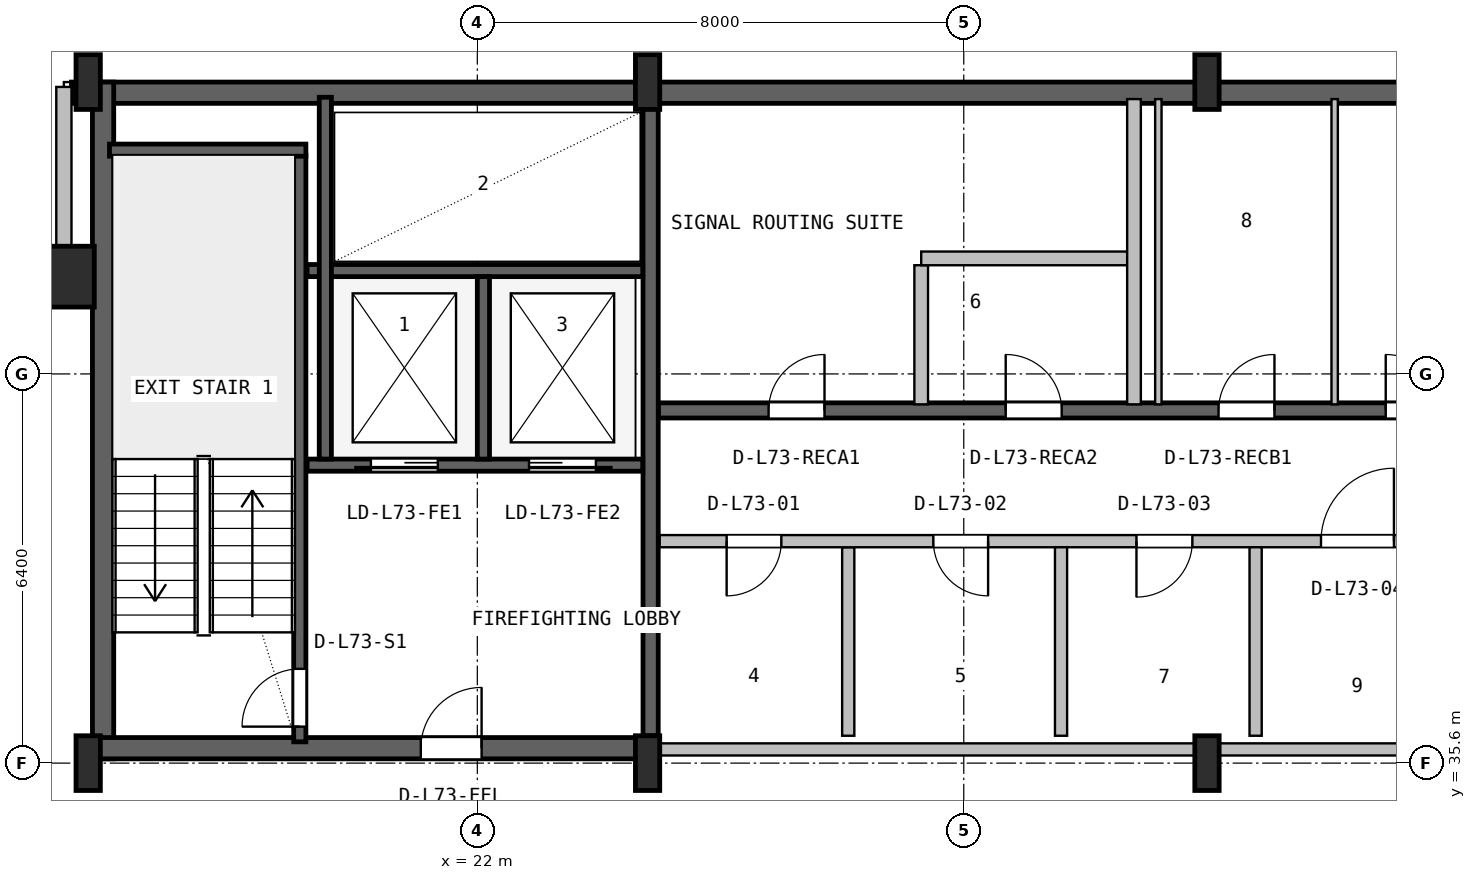
"""IFC4 building model, lengths in metres.
Left out: names, types, materials, properties, quantities, classifications, styles, units other than length and angle.
Written with IfcOpenShell. Run it as: python <this file> out.ifc"""

import sys

from ifc_helpers import new_model, si_unit, direction, frame, frame_2d, origin, origin_2d, place, context, subcontext, project, spatial, rectangle, hollow_rectangle, i_section, extrude, source, transform, mapped, element, fill, save


model = new_model("IFC4")
c1 = context("Model", 3, precision=1e-05, world=origin(), true_north=direction((0.0, 1.0)))
c2 = subcontext(c1, "Body", "Model", "MODEL_VIEW")
j1 = project(units=[si_unit("LENGTHUNIT", "METRE"), si_unit("PLANEANGLEUNIT", "RADIAN")], contexts=[c1])
p1 = place(None, origin())
s1 = spatial("IfcSite", under=j1, at=p1, CompositionType="ELEMENT")
p2 = place(p1, origin())
s2 = spatial("IfcBuilding", under=s1, at=p2, CompositionType="ELEMENT")
p3 = place(p2, frame((0.0, 0.0, 292.6)))
s3 = spatial("IfcBuildingStorey", under=s2, at=p3, CompositionType="ELEMENT", Elevation=292.6)
p4 = place(p3, frame((15.325, 46.625, 0.0), z_axis=(0.0, 0.0, 1.0), x_axis=(1.0, 0.0, 0.0)))
e1 = element("IfcWall", 1, at=p4, inside=s3, PredefinedType="SHEAR", context=c2, shape_type="SweptSolid", body=[
    extrude(rectangle(XDim=37.35, YDim=0.35, at=frame_2d((18.675, 0.0))), origin(), (0.0, 0.0, 1.0), 3.55),
])
p5 = place(p3, frame((15.845, 35.67, 0.0), z_axis=(0.0, 0.0, 1.0), x_axis=(0.0, 1.0, 0.0)))
e2 = element("IfcWall", 2, at=p5, inside=s3, PredefinedType="SHEAR", context=c2, shape_type="SweptSolid", body=[
    extrude(rectangle(XDim=11.13, YDim=0.35, at=frame_2d((5.565, 0.0))), origin(), (0.0, 0.0, 1.0), 3.55),
])
p6 = place(p3, frame((15.67, 35.845, 0.0), z_axis=(0.0, 0.0, 1.0), x_axis=(1.0, 0.0, 0.0)))
e3 = element("IfcWall", 3, at=p6, inside=s3, PredefinedType="SHEAR", context=c2, shape_type="SweptSolid", body=[
    extrude(rectangle(XDim=9.13, YDim=0.35, at=frame_2d((4.565, 0.0))), origin(), (0.0, 0.0, 1.0), 3.55),
])
p7 = place(p6, frame((5.4, 0.0, 0.0)))
e4 = element("IfcOpeningElement", 4, at=p7, cuts=e3, PredefinedType="OPENING", context=c2, shape_type="SweptSolid", body=[
    extrude(rectangle(XDim=1.0, YDim=2.1, at=frame_2d((0.5, 1.05))), frame((0.0, 0.185, 0.0), z_axis=(0.0, -1.0, 0.0), x_axis=(1.0, 0.0, 0.0)), (0.0, 0.0, 1.0), 0.37),
])
m1 = source(origin(), c2, "Body", "SweptSolid", [
    extrude(i_section(OverallWidth=0.4, OverallDepth=0.9, WebThickness=0.016, FlangeThickness=0.028, FilletRadius=0.016, at=origin_2d()), origin(), (0.0, 0.0, 1.0), 3.8),
])
for number, where, z_axis, x_axis in (
    (5, (15.6, 35.6, 0.0), (0.0, 0.0, 1.0), (1.0, 0.0, 0.0)),
    (6, (15.6, 46.8, 0.0), (0.0, 0.0, 1.0), (1.0, 0.0, 0.0)),
    (7, (24.8, 35.6, 0.0), (0.0, 0.0, 1.0), (1.0, 0.0, 0.0)),
    (8, (24.8, 46.8, 0.0), (0.0, 0.0, 1.0), (1.0, 0.0, 0.0)),
    (9, (34.0, 35.6, 0.0), (0.0, 0.0, 1.0), (1.0, 0.0, 0.0)),
    (10, (34.0, 46.8, 0.0), (0.0, 0.0, 1.0), (1.0, 0.0, 0.0)),
):
    element("IfcColumn", number, at=place(p3, frame(where, z_axis=z_axis, x_axis=x_axis)), inside=s3, PredefinedType="COLUMN", context=c2, shape_type="MappedRepresentation", body=[
        mapped(m1, transform((0.0, 0.0, 0.0), x_axis=(1.0, 0.0, 0.0), y_axis=(0.0, 1.0, 0.0), z_axis=(0.0, 0.0, 1.0), scale=1.0)),
    ])
m2 = source(origin(), c2, "Body", "SweptSolid", [
    extrude(hollow_rectangle(XDim=1.0, YDim=1.0, WallThickness=0.04, at=origin_2d()), origin(), (0.0, 0.0, 1.0), 3.8),
])
p8 = place(p3, frame((15.2, 43.6, 0.0), z_axis=(0.0, 0.0, 1.0), x_axis=(1.0, 0.0, 0.0)))
e11 = element("IfcColumn", 11, at=p8, inside=s3, PredefinedType="COLUMN", context=c2, shape_type="MappedRepresentation", body=[
    mapped(m2, transform((0.0, 0.0, 0.0), x_axis=(1.0, 0.0, 0.0), y_axis=(0.0, 1.0, 0.0), z_axis=(0.0, 0.0, 1.0), scale=1.0)),
])
p9 = place(p3, frame((12.08, 43.6, 0.0), z_axis=(0.0, 0.0, 1.0), x_axis=(1.0, 0.0, 0.0)))
e12 = element("IfcWall", 12, at=p9, inside=s3, PredefinedType="SOLIDWALL", context=c2, shape_type="SweptSolid", body=[
    extrude(rectangle(XDim=2.99, YDim=0.25, at=frame_2d((1.495, 0.0))), origin(), (0.0, 0.0, 1.0), 3.53),
])
p10 = place(p3, frame((15.2, 43.52, 0.0), z_axis=(0.0, 0.0, 1.0), x_axis=(0.0, 1.0, 0.0)))
e13 = element("IfcWall", 13, at=p10, inside=s3, PredefinedType="SOLIDWALL", context=c2, shape_type="SweptSolid", body=[
    extrude(rectangle(XDim=3.2, YDim=0.25, at=frame_2d((1.6, 0.0))), origin(), (0.0, 0.0, 1.0), 3.171),
])
p11 = place(p3, frame((19.08, 35.95, 0.0), z_axis=(0.0, 0.0, 1.0), x_axis=(0.0, 1.0, 0.0)))
e14 = element("IfcWall", 14, at=p11, inside=s3, PredefinedType="SHEAR", context=c2, shape_type="SweptSolid", body=[
    extrude(rectangle(XDim=9.65, YDim=0.2, at=frame_2d((4.825, 0.0))), origin(), (0.0, 0.0, 1.0), 3.55),
])
p12 = place(p11, frame((0.25, 0.0, 0.0)))
e15 = element("IfcOpeningElement", 15, at=p12, cuts=e14, PredefinedType="OPENING", context=c2, shape_type="SweptSolid", body=[
    extrude(rectangle(XDim=0.95, YDim=2.1, at=frame_2d((0.475, 1.05))), frame((0.0, 0.11, 0.0), z_axis=(0.0, -1.0, 0.0), x_axis=(1.0, 0.0, 0.0)), (0.0, 0.0, 1.0), 0.22),
])
p13 = place(p3, frame((15.95, 45.68, 0.0), z_axis=(0.0, 0.0, 1.0), x_axis=(1.0, 0.0, 0.0)))
e16 = element("IfcWall", 16, at=p13, inside=s3, PredefinedType="SHEAR", context=c2, shape_type="SweptSolid", body=[
    extrude(rectangle(XDim=3.23, YDim=0.2, at=frame_2d((1.615, 0.0))), origin(), (0.0, 0.0, 1.0), 3.55),
])
p14 = place(p3, frame((24.85, 36.05, 0.0), z_axis=(0.0, 0.0, 1.0), x_axis=(0.0, 1.0, 0.0)))
e17 = element("IfcWall", 17, at=p14, inside=s3, PredefinedType="SHEAR", context=c2, shape_type="SweptSolid", body=[
    extrude(rectangle(XDim=10.45, YDim=0.25, at=frame_2d((5.225, 0.0))), origin(), (0.0, 0.0, 1.0), 3.55),
])
p15 = place(p3, frame((19.2, 40.5, 0.0), z_axis=(0.0, 0.0, 1.0), x_axis=(1.0, 0.0, 0.0)))
e18 = element("IfcWall", 18, at=p15, inside=s3, PredefinedType="SHEAR", context=c2, shape_type="SweptSolid", body=[
    extrude(rectangle(XDim=5.52, YDim=0.2, at=frame_2d((2.76, 0.0))), origin(), (0.0, 0.0, 1.0), 3.55),
])
p16 = place(p15, frame((1.05, 0.0, 0.0)))
e19 = element("IfcOpeningElement", 19, at=p16, cuts=e18, PredefinedType="OPENING", context=c2, shape_type="SweptSolid", body=[
    extrude(rectangle(XDim=1.1, YDim=2.18, at=frame_2d((0.55, 1.09))), frame((0.0, 0.11, 0.0), z_axis=(0.0, -1.0, 0.0), x_axis=(1.0, 0.0, 0.0)), (0.0, 0.0, 1.0), 0.22),
])
p17 = place(p15, frame((3.65, 0.0, 0.0)))
e20 = element("IfcOpeningElement", 20, at=p17, cuts=e18, PredefinedType="OPENING", context=c2, shape_type="SweptSolid", body=[
    extrude(rectangle(XDim=1.1, YDim=2.18, at=frame_2d((0.55, 1.09))), frame((0.0, 0.11, 0.0), z_axis=(0.0, -1.0, 0.0), x_axis=(1.0, 0.0, 0.0)), (0.0, 0.0, 1.0), 0.22),
])
p18 = place(p3, frame((19.2, 43.7, 0.0), z_axis=(0.0, 0.0, 1.0), x_axis=(1.0, 0.0, 0.0)))
e21 = element("IfcWall", 21, at=p18, inside=s3, PredefinedType="SHEAR", context=c2, shape_type="SweptSolid", body=[
    extrude(rectangle(XDim=5.52, YDim=0.2, at=frame_2d((2.76, 0.0))), origin(), (0.0, 0.0, 1.0), 3.55),
])
p19 = place(p3, frame((22.1, 40.6, 0.0), z_axis=(0.0, 0.0, 1.0), x_axis=(0.0, 1.0, 0.0)))
e22 = element("IfcWall", 22, at=p19, inside=s3, PredefinedType="SHEAR", context=c2, shape_type="SweptSolid", body=[
    extrude(rectangle(XDim=3.0, YDim=0.2, at=frame_2d((1.5, 0.0))), origin(), (0.0, 0.0, 1.0), 3.55),
])
p20 = place(p3, frame((19.5, 40.6, 0.0), z_axis=(0.0, 0.0, 1.0), x_axis=(0.0, 1.0, 0.0)))
e23 = element("IfcWall", 23, at=p20, inside=s3, PredefinedType="SHEAR", context=c2, shape_type="SweptSolid", body=[
    extrude(rectangle(XDim=5.95, YDim=0.2, at=frame_2d((2.975, 0.0))), origin(), (0.0, 0.0, 1.0), 3.55),
])
p21 = place(p3, frame((24.98, 41.4, 0.0), z_axis=(0.0, 0.0, 1.0), x_axis=(1.0, 0.0, 0.0)))
e24 = element("IfcWall", 24, at=p21, inside=s3, PredefinedType="SHEAR", context=c2, shape_type="SweptSolid", body=[
    extrude(rectangle(XDim=23.82, YDim=0.25, at=frame_2d((11.91, 0.0))), origin(), (0.0, 0.0, 1.0), 3.55),
])
p22 = place(p21, frame((16.87, 0.0, 0.0)))
e25 = element("IfcOpeningElement", 25, at=p22, cuts=e24, PredefinedType="OPENING", context=c2, shape_type="SweptSolid", body=[
    extrude(rectangle(XDim=1.1, YDim=2.18, at=frame_2d((0.55, 1.09))), frame((0.0, 0.135, 0.0), z_axis=(0.0, -1.0, 0.0), x_axis=(1.0, 0.0, 0.0)), (0.0, 0.0, 1.0), 0.27),
])
p23 = place(p21, frame((19.47, 0.0, 0.0)))
e26 = element("IfcOpeningElement", 26, at=p23, cuts=e24, PredefinedType="OPENING", context=c2, shape_type="SweptSolid", body=[
    extrude(rectangle(XDim=1.1, YDim=2.18, at=frame_2d((0.55, 1.09))), frame((0.0, 0.135, 0.0), z_axis=(0.0, -1.0, 0.0), x_axis=(1.0, 0.0, 0.0)), (0.0, 0.0, 1.0), 0.27),
])
p24 = place(p21, frame((22.07, 0.0, 0.0)))
e27 = element("IfcOpeningElement", 27, at=p24, cuts=e24, PredefinedType="OPENING", context=c2, shape_type="SweptSolid", body=[
    extrude(rectangle(XDim=1.1, YDim=2.18, at=frame_2d((0.55, 1.09))), frame((0.0, 0.135, 0.0), z_axis=(0.0, -1.0, 0.0), x_axis=(1.0, 0.0, 0.0)), (0.0, 0.0, 1.0), 0.27),
])
p25 = place(p21, frame((1.81, 0.0, 0.0)))
e28 = element("IfcOpeningElement", 28, at=p25, cuts=e24, PredefinedType="OPENING", context=c2, shape_type="SweptSolid", body=[
    extrude(rectangle(XDim=0.92, YDim=2.08, at=frame_2d((0.46, 1.04))), frame((0.0, 0.135, 0.0), z_axis=(0.0, -1.0, 0.0), x_axis=(1.0, 0.0, 0.0)), (0.0, 0.0, 1.0), 0.27),
])
p26 = place(p21, frame((5.71, 0.0, 0.0)))
e29 = element("IfcOpeningElement", 29, at=p26, cuts=e24, PredefinedType="OPENING", context=c2, shape_type="SweptSolid", body=[
    extrude(rectangle(XDim=0.92, YDim=2.08, at=frame_2d((0.46, 1.04))), frame((0.0, 0.135, 0.0), z_axis=(0.0, -1.0, 0.0), x_axis=(1.0, 0.0, 0.0)), (0.0, 0.0, 1.0), 0.27),
])
p27 = place(p21, frame((9.21, 0.0, 0.0)))
e30 = element("IfcOpeningElement", 30, at=p27, cuts=e24, PredefinedType="OPENING", context=c2, shape_type="SweptSolid", body=[
    extrude(rectangle(XDim=0.92, YDim=2.08, at=frame_2d((0.46, 1.04))), frame((0.0, 0.135, 0.0), z_axis=(0.0, -1.0, 0.0), x_axis=(1.0, 0.0, 0.0)), (0.0, 0.0, 1.0), 0.27),
])
p28 = place(p21, frame((11.96, 0.0, 0.0)))
e31 = element("IfcOpeningElement", 31, at=p28, cuts=e24, PredefinedType="OPENING", context=c2, shape_type="SweptSolid", body=[
    extrude(rectangle(XDim=0.92, YDim=2.08, at=frame_2d((0.46, 1.04))), frame((0.0, 0.135, 0.0), z_axis=(0.0, -1.0, 0.0), x_axis=(1.0, 0.0, 0.0)), (0.0, 0.0, 1.0), 0.27),
])
p29 = place(p21, frame((14.31, 0.0, 0.0)))
e32 = element("IfcOpeningElement", 32, at=p29, cuts=e24, PredefinedType="OPENING", context=c2, shape_type="SweptSolid", body=[
    extrude(rectangle(XDim=0.92, YDim=2.08, at=frame_2d((0.46, 1.04))), frame((0.0, 0.135, 0.0), z_axis=(0.0, -1.0, 0.0), x_axis=(1.0, 0.0, 0.0)), (0.0, 0.0, 1.0), 0.27),
])
p30 = place(p3, frame((25.0, 35.825, 0.0), z_axis=(0.0, 0.0, 1.0), x_axis=(1.0, 0.0, 0.0)))
e33 = element("IfcWall", 33, at=p30, inside=s3, PredefinedType="SOLIDWALL", context=c2, shape_type="SweptSolid", body=[
    extrude(rectangle(XDim=12.95, YDim=0.2, at=frame_2d((6.475, 0.0))), origin(), (0.0, 0.0, 1.0), 2.575),
])
p31 = place(p3, frame((28.1, 36.05, 0.0), z_axis=(0.0, 0.0, 1.0), x_axis=(0.0, 1.0, 0.0)))
e34 = element("IfcWall", 34, at=p31, inside=s3, PredefinedType="PLUMBINGWALL", context=c2, shape_type="SweptSolid", body=[
    extrude(rectangle(XDim=3.1, YDim=0.2, at=frame_2d((1.55, 0.0))), origin(), (0.0, 0.0, 1.0), 3.53),
])
p32 = place(p3, frame((25.0, 39.25, 0.0), z_axis=(0.0, 0.0, 1.0), x_axis=(1.0, 0.0, 0.0)))
e35 = element("IfcWall", 35, at=p32, inside=s3, PredefinedType="SOLIDWALL", context=c2, shape_type="SweptSolid", body=[
    extrude(rectangle(XDim=12.95, YDim=0.2, at=frame_2d((6.475, 0.0))), origin(), (0.0, 0.0, 1.0), 3.53),
])
p33 = place(p32, frame((1.1, 0.0, 0.0)))
e36 = element("IfcOpeningElement", 36, at=p33, cuts=e35, PredefinedType="OPENING", context=c2, shape_type="SweptSolid", body=[
    extrude(rectangle(XDim=0.9, YDim=2.06, at=frame_2d((0.45, 1.03))), frame((0.0, 0.11, 0.0), z_axis=(0.0, -1.0, 0.0), x_axis=(1.0, 0.0, 0.0)), (0.0, 0.0, 1.0), 0.22),
])
p34 = place(p32, frame((4.5, 0.0, 0.0)))
e37 = element("IfcOpeningElement", 37, at=p34, cuts=e35, PredefinedType="OPENING", context=c2, shape_type="SweptSolid", body=[
    extrude(rectangle(XDim=0.9, YDim=2.06, at=frame_2d((0.45, 1.03))), frame((0.0, 0.11, 0.0), z_axis=(0.0, -1.0, 0.0), x_axis=(1.0, 0.0, 0.0)), (0.0, 0.0, 1.0), 0.22),
])
p35 = place(p32, frame((7.84, 0.0, 0.0)))
e38 = element("IfcOpeningElement", 38, at=p35, cuts=e35, PredefinedType="OPENING", context=c2, shape_type="SweptSolid", body=[
    extrude(rectangle(XDim=0.92, YDim=2.08, at=frame_2d((0.46, 1.04))), frame((0.0, 0.11, 0.0), z_axis=(0.0, -1.0, 0.0), x_axis=(1.0, 0.0, 0.0)), (0.0, 0.0, 1.0), 0.22),
])
p36 = place(p32, frame((10.875, 0.0, 0.0)))
e39 = element("IfcOpeningElement", 39, at=p36, cuts=e35, PredefinedType="OPENING", context=c2, shape_type="SweptSolid", body=[
    extrude(rectangle(XDim=1.2, YDim=2.1, at=frame_2d((0.6, 1.05))), frame((0.0, 0.11, 0.0), z_axis=(0.0, -1.0, 0.0), x_axis=(1.0, 0.0, 0.0)), (0.0, 0.0, 1.0), 0.22),
])
p37 = place(p3, frame((31.6, 36.05, 0.0), z_axis=(0.0, 0.0, 1.0), x_axis=(0.0, 1.0, 0.0)))
e40 = element("IfcWall", 40, at=p37, inside=s3, PredefinedType="PLUMBINGWALL", context=c2, shape_type="SweptSolid", body=[
    extrude(rectangle(XDim=3.1, YDim=0.2, at=frame_2d((1.55, 0.0))), origin(), (0.0, 0.0, 1.0), 3.53),
])
p38 = place(p3, frame((34.8, 36.05, 0.0), z_axis=(0.0, 0.0, 1.0), x_axis=(0.0, 1.0, 0.0)))
e41 = element("IfcWall", 41, at=p38, inside=s3, PredefinedType="SOLIDWALL", context=c2, shape_type="SweptSolid", body=[
    extrude(rectangle(XDim=3.1, YDim=0.2, at=frame_2d((1.55, 0.0))), origin(), (0.0, 0.0, 1.0), 3.53),
])
p39 = place(p3, frame((29.3, 41.5, 0.0), z_axis=(0.0, 0.0, 1.0), x_axis=(0.0, 1.0, 0.0)))
e42 = element("IfcWall", 42, at=p39, inside=s3, PredefinedType="PARTITIONING", context=c2, shape_type="SweptSolid", body=[
    extrude(rectangle(XDim=2.288, YDim=0.225, at=frame_2d((1.144, 0.0))), origin(), (0.0, 0.0, 1.0), 3.53),
])
p40 = place(p3, frame((29.3, 43.9, 0.0), z_axis=(0.0, 0.0, 1.0), x_axis=(1.0, 0.0, 0.0)))
e43 = element("IfcWall", 43, at=p40, inside=s3, PredefinedType="PARTITIONING", context=c2, shape_type="SweptSolid", body=[
    extrude(rectangle(XDim=3.5, YDim=0.225, at=frame_2d((1.75, 0.0))), origin(), (0.0, 0.0, 1.0), 3.53),
])
p41 = place(p3, frame((32.8, 41.5, 0.0), z_axis=(0.0, 0.0, 1.0), x_axis=(0.0, 1.0, 0.0)))
e44 = element("IfcWall", 44, at=p41, inside=s3, PredefinedType="PARTITIONING", context=c2, shape_type="SweptSolid", body=[
    extrude(rectangle(XDim=5.02, YDim=0.225, at=frame_2d((2.51, 0.0))), origin(), (0.0, 0.0, 1.0), 3.53),
])
for number, where, z_axis, x_axis in (
    (45, (36.1, 41.5, 0.0), (0.0, 0.0, 1.0), (0.0, 1.0, 0.0)),
    (46, (33.2, 41.5, 0.0), (0.0, 0.0, 1.0), (0.0, 1.0, 0.0)),
):
    element("IfcWall", number, at=place(p3, frame(where, z_axis=z_axis, x_axis=x_axis)), inside=s3, PredefinedType="PARTITIONING", context=c2, shape_type="SweptSolid", body=[
        extrude(rectangle(XDim=5.02, YDim=0.105, at=frame_2d((2.51, 0.0))), origin(), (0.0, 0.0, 1.0), 3.53),
    ])
m3 = source(origin(), c2, "Body", "SweptSolid", [
    extrude(rectangle(XDim=0.95, YDim=2.1, at=frame_2d((0.475, 1.05))), frame((0.0, 0.025, 0.0), z_axis=(0.0, -1.0, 0.0), x_axis=(1.0, 0.0, 0.0)), (0.0, 0.0, 1.0), 0.05),
])
p42 = place(p12, origin())
e47 = element("IfcDoor", 47, at=p42, inside=s3, OperationType="SINGLE_SWING_LEFT", PredefinedType="DOOR", context=c2, shape_type="MappedRepresentation", body=[
    mapped(m3, transform((0.0, 0.0, 0.0), x_axis=(1.0, 0.0, 0.0), y_axis=(0.0, 1.0, 0.0), z_axis=(0.0, 0.0, 1.0), scale=1.0)),
])
fill(e15, e47)
m4 = source(origin(), c2, "Body", "SweptSolid", [
    extrude(rectangle(XDim=1.0, YDim=2.1, at=frame_2d((0.5, 1.05))), frame((0.0, 0.025, 0.0), z_axis=(0.0, -1.0, 0.0), x_axis=(1.0, 0.0, 0.0)), (0.0, 0.0, 1.0), 0.05),
])
p43 = place(p7, origin())
e48 = element("IfcDoor", 48, at=p43, inside=s3, OperationType="SINGLE_SWING_RIGHT", PredefinedType="DOOR", context=c2, shape_type="MappedRepresentation", body=[
    mapped(m4, transform((0.0, 0.0, 0.0), x_axis=(1.0, 0.0, 0.0), y_axis=(0.0, 1.0, 0.0), z_axis=(0.0, 0.0, 1.0), scale=1.0)),
])
fill(e4, e48)
m5 = source(origin(), c2, "Body", "SweptSolid", [
    extrude(rectangle(XDim=1.1, YDim=2.18, at=frame_2d((0.55, 1.09))), frame((0.0, 0.025, 0.0), z_axis=(0.0, -1.0, 0.0), x_axis=(1.0, 0.0, 0.0)), (0.0, 0.0, 1.0), 0.05),
])
p44 = place(p16, frame((1.1, 0.0, 0.0), z_axis=(0.0, 0.0, 1.0), x_axis=(-1.0, 0.0, 0.0)))
e49 = element("IfcDoor", 49, at=p44, inside=s3, OperationType="SLIDING_TO_LEFT", PredefinedType="DOOR", context=c2, shape_type="MappedRepresentation", body=[
    mapped(m5, transform((0.0, 0.0, 0.0), x_axis=(1.0, 0.0, 0.0), y_axis=(0.0, 1.0, 0.0), z_axis=(0.0, 0.0, 1.0), scale=1.0)),
])
fill(e19, e49)
p45 = place(p17, frame((1.1, 0.0, 0.0), z_axis=(0.0, 0.0, 1.0), x_axis=(-1.0, 0.0, 0.0)))
e50 = element("IfcDoor", 50, at=p45, inside=s3, OperationType="SLIDING_TO_RIGHT", PredefinedType="DOOR", context=c2, shape_type="MappedRepresentation", body=[
    mapped(m5, transform((0.0, 0.0, 0.0), x_axis=(1.0, 0.0, 0.0), y_axis=(0.0, 1.0, 0.0), z_axis=(0.0, 0.0, 1.0), scale=1.0)),
])
fill(e20, e50)
m6 = source(origin(), c2, "Body", "SweptSolid", [
    extrude(rectangle(XDim=0.92, YDim=2.08, at=frame_2d((0.46, 1.04))), frame((0.0, 0.025, 0.0), z_axis=(0.0, -1.0, 0.0), x_axis=(1.0, 0.0, 0.0)), (0.0, 0.0, 1.0), 0.05),
])
p46 = place(p25, origin())
e51 = element("IfcDoor", 51, at=p46, inside=s3, OperationType="SINGLE_SWING_RIGHT", PredefinedType="DOOR", context=c2, shape_type="MappedRepresentation", body=[
    mapped(m6, transform((0.0, 0.0, 0.0), x_axis=(1.0, 0.0, 0.0), y_axis=(0.0, 1.0, 0.0), z_axis=(0.0, 0.0, 1.0), scale=1.0)),
])
fill(e28, e51)
p47 = place(p26, origin())
e52 = element("IfcDoor", 52, at=p47, inside=s3, OperationType="SINGLE_SWING_LEFT", PredefinedType="DOOR", context=c2, shape_type="MappedRepresentation", body=[
    mapped(m6, transform((0.0, 0.0, 0.0), x_axis=(1.0, 0.0, 0.0), y_axis=(0.0, 1.0, 0.0), z_axis=(0.0, 0.0, 1.0), scale=1.0)),
])
fill(e29, e52)
p48 = place(p27, origin())
e53 = element("IfcDoor", 53, at=p48, inside=s3, OperationType="SINGLE_SWING_RIGHT", PredefinedType="DOOR", context=c2, shape_type="MappedRepresentation", body=[
    mapped(m6, transform((0.0, 0.0, 0.0), x_axis=(1.0, 0.0, 0.0), y_axis=(0.0, 1.0, 0.0), z_axis=(0.0, 0.0, 1.0), scale=1.0)),
])
fill(e30, e53)
p49 = place(p28, origin())
e54 = element("IfcDoor", 54, at=p49, inside=s3, OperationType="SINGLE_SWING_LEFT", PredefinedType="DOOR", context=c2, shape_type="MappedRepresentation", body=[
    mapped(m6, transform((0.0, 0.0, 0.0), x_axis=(1.0, 0.0, 0.0), y_axis=(0.0, 1.0, 0.0), z_axis=(0.0, 0.0, 1.0), scale=1.0)),
])
fill(e31, e54)
m7 = source(origin(), c2, "Body", "SweptSolid", [
    extrude(rectangle(XDim=0.9, YDim=2.06, at=frame_2d((0.45, 1.03))), frame((0.0, 0.025, 0.0), z_axis=(0.0, -1.0, 0.0), x_axis=(1.0, 0.0, 0.0)), (0.0, 0.0, 1.0), 0.05),
])
p50 = place(p33, frame((0.9, 0.0, 0.0), z_axis=(0.0, 0.0, 1.0), x_axis=(-1.0, 0.0, 0.0)))
e55 = element("IfcDoor", 55, at=p50, inside=s3, OperationType="SINGLE_SWING_LEFT", PredefinedType="DOOR", context=c2, shape_type="MappedRepresentation", body=[
    mapped(m7, transform((0.0, 0.0, 0.0), x_axis=(1.0, 0.0, 0.0), y_axis=(0.0, 1.0, 0.0), z_axis=(0.0, 0.0, 1.0), scale=1.0)),
])
fill(e36, e55)
p51 = place(p34, frame((0.9, 0.0, 0.0), z_axis=(0.0, 0.0, 1.0), x_axis=(-1.0, 0.0, 0.0)))
e56 = element("IfcDoor", 56, at=p51, inside=s3, OperationType="SINGLE_SWING_RIGHT", PredefinedType="DOOR", context=c2, shape_type="MappedRepresentation", body=[
    mapped(m7, transform((0.0, 0.0, 0.0), x_axis=(1.0, 0.0, 0.0), y_axis=(0.0, 1.0, 0.0), z_axis=(0.0, 0.0, 1.0), scale=1.0)),
])
fill(e37, e56)
p52 = place(p35, frame((0.92, 0.0, 0.0), z_axis=(0.0, 0.0, 1.0), x_axis=(-1.0, 0.0, 0.0)))
e57 = element("IfcDoor", 57, at=p52, inside=s3, OperationType="SINGLE_SWING_LEFT", PredefinedType="DOOR", context=c2, shape_type="MappedRepresentation", body=[
    mapped(m6, transform((0.0, 0.0, 0.0), x_axis=(1.0, 0.0, 0.0), y_axis=(0.0, 1.0, 0.0), z_axis=(0.0, 0.0, 1.0), scale=1.0)),
])
fill(e38, e57)
m8 = source(origin(), c2, "Body", "SweptSolid", [
    extrude(rectangle(XDim=1.2, YDim=2.1, at=frame_2d((0.6, 1.05))), frame((0.0, 0.025, 0.0), z_axis=(0.0, -1.0, 0.0), x_axis=(1.0, 0.0, 0.0)), (0.0, 0.0, 1.0), 0.05),
])
p53 = place(p36, origin())
e58 = element("IfcDoor", 58, at=p53, inside=s3, OperationType="SINGLE_SWING_RIGHT", PredefinedType="DOOR", context=c2, shape_type="MappedRepresentation", body=[
    mapped(m8, transform((0.0, 0.0, 0.0), x_axis=(1.0, 0.0, 0.0), y_axis=(0.0, 1.0, 0.0), z_axis=(0.0, 0.0, 1.0), scale=1.0)),
])
fill(e39, e58)
save(model, sys.argv[1])
